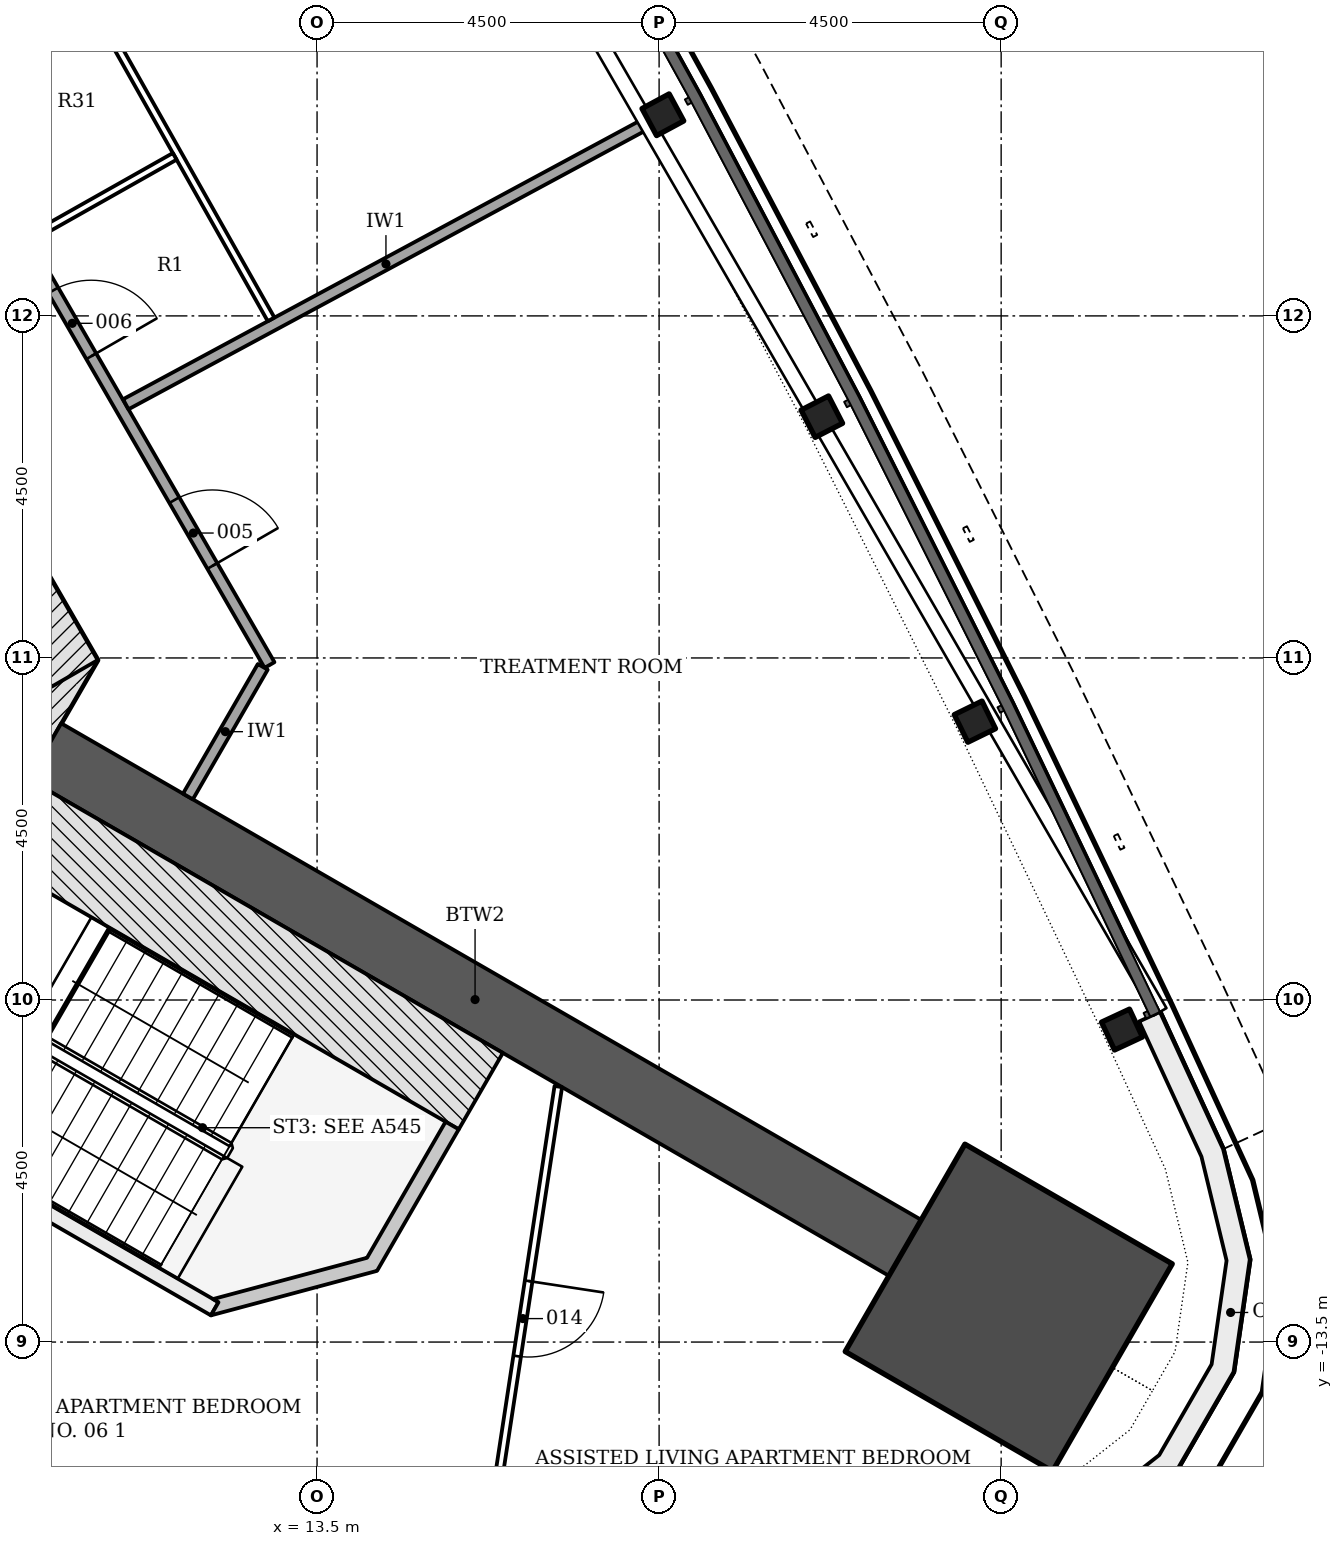
"""IFC4 building model, lengths in metres.
Left out: names, types, materials, properties, quantities, classifications, styles, units other than length and angle.
Written with IfcOpenShell. Run it as: python <this file> out.ifc"""

import sys

from ifc_helpers import new_model, si_unit, direction, frame, frame_2d, origin, origin_2d, place, context, subcontext, project, spatial, polyline, rectangle, i_section, outline, extrude, element, fill, save


model = new_model("IFC4")
c1 = context("Model", 3, precision=1e-05, world=origin(), true_north=direction((0.0, 1.0)))
c2 = subcontext(c1, "Body", "Model", "MODEL_VIEW")
j1 = project(units=[si_unit("LENGTHUNIT", "METRE"), si_unit("PLANEANGLEUNIT", "RADIAN")], contexts=[c1])
p1 = place(None, origin())
s1 = spatial("IfcSite", under=j1, at=p1, CompositionType="ELEMENT")
p2 = place(p1, origin())
s2 = spatial("IfcBuilding", under=s1, at=p2, CompositionType="ELEMENT")
p3 = place(p2, frame((0.0, 0.0, 79.8)))
s3 = spatial("IfcBuildingStorey", under=s2, at=p3, CompositionType="ELEMENT", Elevation=79.8)
p4 = place(p3, frame((8.926, -6.753, -0.2), z_axis=(0.0, 0.0, 1.0), x_axis=(0.500042739161, 0.866000726912, 0.0)))
e1 = element("IfcWall", 1, at=p4, inside=s3, PredefinedType="SHEAR", context=c2, shape_type="SweptSolid", body=[
    extrude(rectangle(XDim=2.771, YDim=0.7, at=frame_2d((1.386, 0.0))), origin(), (0.0, 0.0, 1.0), 3.6),
])
p5 = place(p3, frame((10.311, -4.703, -0.2), z_axis=(0.0, 0.0, 1.0), x_axis=(-0.500001446645, 0.866024568562, 0.0)))
e2 = element("IfcWall", 2, at=p5, inside=s3, PredefinedType="SHEAR", context=c2, shape_type="SweptSolid", body=[
    extrude(rectangle(XDim=18.458, YDim=0.7, at=frame_2d((9.229, 0.0))), origin(), (0.0, 0.0, 1.0), 3.6),
])
p6 = place(p5, frame((5.9, 0.0, 0.2)))
e3 = element("IfcOpeningElement", 3, at=p6, cuts=e2, PredefinedType="OPENING", context=c2, shape_type="SweptSolid", body=[
    extrude(rectangle(XDim=1.0, YDim=2.1, at=frame_2d((0.5, 1.05))), frame((0.0, 0.36, 0.0), z_axis=(0.0, -1.0, 0.0), x_axis=(1.0, 0.0, 0.0)), (0.0, 0.0, 1.0), 0.72),
])
p7 = place(p5, frame((1.452, 0.0, 0.2)))
e4 = element("IfcOpeningElement", 4, at=p7, cuts=e2, PredefinedType="OPENING", context=c2, shape_type="SweptSolid", body=[
    extrude(rectangle(XDim=0.9, YDim=2.1, at=frame_2d((0.45, 1.05))), frame((0.0, 0.36, 0.0), z_axis=(0.0, -1.0, 0.0), x_axis=(1.0, 0.0, 0.0)), (0.0, 0.0, 1.0), 0.72),
])
p8 = place(p5, frame((4.396, 0.0, 0.2)))
e5 = element("IfcOpeningElement", 5, at=p8, cuts=e2, PredefinedType="OPENING", context=c2, shape_type="SweptSolid", body=[
    extrude(rectangle(XDim=0.9, YDim=2.1, at=frame_2d((0.45, 1.05))), frame((0.0, 0.36, 0.0), z_axis=(0.0, -1.0, 0.0), x_axis=(1.0, 0.0, 0.0)), (0.0, 0.0, 1.0), 0.72),
])
p9 = place(p5, frame((13.023, 0.0, 0.2)))
e6 = element("IfcOpeningElement", 6, at=p9, cuts=e2, PredefinedType="OPENING", context=c2, shape_type="SweptSolid", body=[
    extrude(rectangle(XDim=0.9, YDim=2.1, at=frame_2d((0.45, 1.05))), frame((0.0, 0.36, 0.0), z_axis=(0.0, -1.0, 0.0), x_axis=(1.0, 0.0, 0.0)), (0.0, 0.0, 1.0), 0.72),
])
p10 = place(p3, frame((9.922, -5.728, -0.2), z_axis=(0.0, 0.0, 1.0), x_axis=(0.866026565165, -0.499997988424, 0.0)))
e7 = element("IfcWall", 7, at=p10, inside=s3, PredefinedType="SHEAR", context=c2, shape_type="SweptSolid", body=[
    extrude(rectangle(XDim=13.064, YDim=0.85, at=frame_2d((6.532, 0.0))), origin(), (0.0, 0.0, 1.0), 3.6),
])
p11 = place(p3, frame((22.6, -13.048, -0.2), z_axis=(0.0, 0.0, 1.0), x_axis=(0.866025403784, -0.5, 0.0)))
e8 = element("IfcColumn", 8, at=p11, inside=s3, PredefinedType="COLUMN", context=c2, shape_type="SweptSolid", body=[
    extrude(rectangle(XDim=3.15, YDim=3.15, at=origin_2d()), origin(), (0.0, 0.0, 1.0), 3.6),
])
for number, where, z_axis, x_axis in (
    (9, (24.09, -9.389, -0.2), (0.0, 0.0, 1.0), (-0.422, 0.906, 0.0)),
    (10, (22.155, -5.338, -0.2), (0.0, 0.0, 1.0), (-0.44, 0.898, 0.0)),
    (11, (20.141, -1.326, -0.2), (0.0, 0.0, 1.0), (-0.457, 0.889, 0.0)),
    (12, (18.05, 2.646, -0.2), (0.0, 0.0, 1.0), (-0.474, 0.88, 0.0)),
):
    element("IfcColumn", number, at=place(p3, frame(where, z_axis=z_axis, x_axis=x_axis)), inside=s3, PredefinedType="COLUMN", context=c2, shape_type="SweptSolid", body=[
        extrude(i_section(OverallWidth=0.404, OverallDepth=0.406, WebThickness=0.027, FlangeThickness=0.044, FilletRadius=0.015, at=origin_2d()), origin(), (0.0, 0.0, 1.0), 3.6),
    ])
p12 = place(p3, origin())
e13 = element("IfcWall", 13, at=p12, inside=s3, PredefinedType="NOTDEFINED", context=c2, shape_type="SweptSolid", body=[
    extrude(outline(polyline([(20.224, -16.716), (22.203, -16.533), (23.636, -16.111), (24.811, -15.187), (25.558, -13.893), (25.771, -12.414), (25.42, -10.962), (24.588, -9.157), (24.316, -9.282), (25.135, -11.061), (25.466, -12.428), (25.269, -13.793), (24.58, -14.987), (23.496, -15.84), (22.146, -16.237), (20.197, -16.417), (20.224, -16.716)])), origin(), (0.0, 0.0, 1.0), 3.3),
])
p13 = place(p3, frame((7.304, -10.262, -0.2), z_axis=(0.0, 0.0, 1.0), x_axis=(0.866026594901, -0.49999793692, 0.0)))
e14 = element("IfcWall", 14, at=p13, inside=s3, PredefinedType="SHEAR", context=c2, shape_type="SweptSolid", body=[
    extrude(rectangle(XDim=5.6, YDim=0.2, at=frame_2d((2.8, 0.0))), origin(), (0.0, 0.0, 1.0), 3.6),
])
p14 = place(p13, frame((0.45, 0.0, 0.2)))
e15 = element("IfcOpeningElement", 15, at=p14, cuts=e14, PredefinedType="OPENING", context=c2, shape_type="SweptSolid", body=[
    extrude(rectangle(XDim=1.2, YDim=2.1, at=frame_2d((0.6, 1.05))), frame((0.0, 0.11, 0.0), z_axis=(0.0, -1.0, 0.0), x_axis=(1.0, 0.0, 0.0)), (0.0, 0.0, 1.0), 0.22),
])
p15 = place(p3, frame((9.419, -6.599, -0.2), z_axis=(0.0, 0.0, 1.0), x_axis=(0.866033125095, -0.499986626058, 0.0)))
e16 = element("IfcWall", 16, at=p15, inside=s3, PredefinedType="SHEAR", context=c2, shape_type="SweptSolid", body=[
    extrude(rectangle(XDim=7.2, YDim=1.161, at=frame_2d((3.6, 0.0))), origin(), (0.0, 0.0, 1.0), 3.6),
])
p16 = place(p3, frame((0.0, 0.0, -0.2)))
e17 = element("IfcWall", 17, at=p16, inside=s3, PredefinedType="SHEAR", context=c2, shape_type="SweptSolid", body=[
    extrude(outline(polyline([(12.104, -13.149), (14.289, -12.563), (15.364, -10.701), (15.191, -10.601), (14.157, -12.392), (12.132, -12.934), (12.204, -12.976), (12.204, -12.976), (12.204, -12.976), (12.204, -12.976), (12.204, -12.976), (12.204, -12.976), (12.204, -12.976), (12.204, -12.976), (12.204, -12.976), (12.204, -12.976), (12.204, -12.976), (12.204, -12.976), (12.204, -12.976), (12.204, -12.976), (12.204, -12.976), (12.204, -12.976), (12.204, -12.976), (12.104, -13.149)])), origin(), (0.0, 0.0, 1.0), 3.6),
])
p17 = place(p3, frame((5.346, 8.446, 0.0), z_axis=(0.0, 0.0, 1.0), x_axis=(0.500008781656, -0.866020333634, 0.0)))
e18 = element("IfcWall", 18, at=p17, inside=s3, PredefinedType="PARTITIONING", context=c2, shape_type="SweptSolid", body=[
    extrude(rectangle(XDim=15.057, YDim=0.15, at=frame_2d((7.528, 0.0))), origin(), (0.0, 0.0, 1.0), 2.778),
])
p18 = place(p17, frame((12.552, 0.0, 0.0)))
e19 = element("IfcOpeningElement", 19, at=p18, cuts=e18, PredefinedType="OPENING", context=c2, shape_type="SweptSolid", body=[
    extrude(rectangle(XDim=1.0, YDim=2.1, at=frame_2d((0.5, 1.05))), frame((0.0, 0.085, 0.0), z_axis=(0.0, -1.0, 0.0), x_axis=(1.0, 0.0, 0.0)), (0.0, 0.0, 1.0), 0.17),
])
p19 = place(p17, frame((9.365, 0.0, 0.0)))
e20 = element("IfcOpeningElement", 20, at=p19, cuts=e18, PredefinedType="OPENING", context=c2, shape_type="SweptSolid", body=[
    extrude(rectangle(XDim=1.0, YDim=2.1, at=frame_2d((0.5, 1.05))), frame((0.0, 0.085, 0.0), z_axis=(0.0, -1.0, 0.0), x_axis=(1.0, 0.0, 0.0)), (0.0, 0.0, 1.0), 0.17),
])
p20 = place(p17, frame((6.816, 0.0, 0.0)))
e21 = element("IfcOpeningElement", 21, at=p20, cuts=e18, PredefinedType="OPENING", context=c2, shape_type="SweptSolid", body=[
    extrude(rectangle(XDim=1.0, YDim=2.1, at=frame_2d((0.5, 1.05))), frame((0.0, 0.085, 0.0), z_axis=(0.0, -1.0, 0.0), x_axis=(1.0, 0.0, 0.0)), (0.0, 0.0, 1.0), 0.17),
])
p21 = place(p17, frame((3.509, 0.0, 0.0)))
e22 = element("IfcOpeningElement", 22, at=p21, cuts=e18, PredefinedType="OPENING", context=c2, shape_type="SweptSolid", body=[
    extrude(rectangle(XDim=1.5, YDim=2.1, at=frame_2d((0.75, 1.05))), frame((0.0, 0.085, 0.0), z_axis=(0.0, -1.0, 0.0), x_axis=(1.0, 0.0, 0.0)), (0.0, 0.0, 1.0), 0.17),
])
p22 = place(p3, frame((11.801, -6.323, 0.0), z_axis=(0.0, 0.0, 1.0), x_axis=(0.500058665202, 0.865991530765, 0.0)))
e23 = element("IfcWall", 23, at=p22, inside=s3, PredefinedType="PARTITIONING", context=c2, shape_type="SweptSolid", body=[
    extrude(rectangle(XDim=1.969, YDim=0.15, at=frame_2d((0.985, 0.0))), origin(), (0.0, 0.0, 1.0), 2.778),
])
p23 = place(p3, frame((17.829, 2.528, 0.0), z_axis=(0.0, 0.0, 1.0), x_axis=(-0.880268417521, -0.474476040612, 0.0)))
e24 = element("IfcWall", 24, at=p23, inside=s3, PredefinedType="PARTITIONING", context=c2, shape_type="SweptSolid", body=[
    extrude(rectangle(XDim=7.777, YDim=0.15, at=frame_2d((3.889, 0.0))), origin(), (0.0, 0.0, 1.0), 2.778),
])
p24 = place(p3, frame((16.674, -10.138, 0.0), z_axis=(0.0, 0.0, 1.0), x_axis=(-0.150869779888, -0.98855364524, 0.0)))
e25 = element("IfcWall", 25, at=p24, inside=s3, PredefinedType="PARTITIONING", context=c2, shape_type="SweptSolid", body=[
    extrude(rectangle(XDim=6.196, YDim=0.1, at=frame_2d((3.098, 0.0))), origin(), (0.0, 0.0, 1.0), 2.923),
])
p25 = place(p24, frame((2.588, 0.0, 0.0)))
e26 = element("IfcOpeningElement", 26, at=p25, cuts=e25, PredefinedType="OPENING", context=c2, shape_type="SweptSolid", body=[
    extrude(rectangle(XDim=1.0, YDim=2.1, at=frame_2d((0.5, 1.05))), frame((0.0, 0.06, 0.0), z_axis=(0.0, -1.0, 0.0), x_axis=(1.0, 0.0, 0.0)), (0.0, 0.0, 1.0), 0.12),
])
p26 = place(p3, frame((12.895, -0.046, 0.0), z_axis=(0.0, 0.0, 1.0), x_axis=(-0.491519870282, 0.870866360079, 0.0)))
e27 = element("IfcWall", 27, at=p26, inside=s3, PredefinedType="PARTITIONING", context=c2, shape_type="SweptSolid", body=[
    extrude(rectangle(XDim=5.091, YDim=0.1, at=frame_2d((2.545, 0.0))), origin(), (0.0, 0.0, 1.0), 2.778),
])
p27 = place(p3, frame((10.349, 4.363, 0.0), z_axis=(0.0, 0.0, 1.0), x_axis=(-0.870794636378, -0.491646927435, 0.0)))
e28 = element("IfcWall", 28, at=p27, inside=s3, PredefinedType="PARTITIONING", context=c2, shape_type="SweptSolid", body=[
    extrude(rectangle(XDim=2.216, YDim=0.1, at=frame_2d((1.108, 0.0))), origin(), (0.0, 0.0, 1.0), 3.4),
])
p28 = place(p3, frame((11.627, 2.099, 0.0), z_axis=(0.0, 0.0, 1.0), x_axis=(-0.870851244214, -0.491546651348, 0.0)))
e29 = element("IfcWall", 29, at=p28, inside=s3, PredefinedType="PARTITIONING", context=c2, shape_type="SweptSolid", body=[
    extrude(rectangle(XDim=2.19, YDim=0.1, at=frame_2d((1.095, 0.0))), origin(), (0.0, 0.0, 1.0), 3.4),
])
p29 = place(p18, origin())
e30 = element("IfcDoor", 30, at=p29, inside=s3, OperationType="SINGLE_SWING_RIGHT", PredefinedType="DOOR", context=c2, shape_type="SweptSolid", body=[
    extrude(rectangle(XDim=1.0, YDim=2.1, at=frame_2d((0.5, 1.05))), frame((0.0, 0.025, 0.0), z_axis=(0.0, -1.0, 0.0), x_axis=(1.0, 0.0, 0.0)), (0.0, 0.0, 1.0), 0.05),
])
fill(e19, e30)
p30 = place(p19, origin())
e31 = element("IfcDoor", 31, at=p30, inside=s3, OperationType="SINGLE_SWING_RIGHT", PredefinedType="DOOR", context=c2, shape_type="SweptSolid", body=[
    extrude(rectangle(XDim=1.0, YDim=2.1, at=frame_2d((0.5, 1.05))), frame((0.0, 0.025, 0.0), z_axis=(0.0, -1.0, 0.0), x_axis=(1.0, 0.0, 0.0)), (0.0, 0.0, 1.0), 0.05),
])
fill(e20, e31)
p31 = place(p25, origin())
e32 = element("IfcDoor", 32, at=p31, inside=s3, OperationType="SINGLE_SWING_LEFT", PredefinedType="DOOR", context=c2, shape_type="SweptSolid", body=[
    extrude(rectangle(XDim=1.0, YDim=2.1, at=frame_2d((0.5, 1.05))), frame((0.0, 0.025, 0.0), z_axis=(0.0, -1.0, 0.0), x_axis=(1.0, 0.0, 0.0)), (0.0, 0.0, 1.0), 0.05),
])
fill(e26, e32)
save(model, sys.argv[1])
